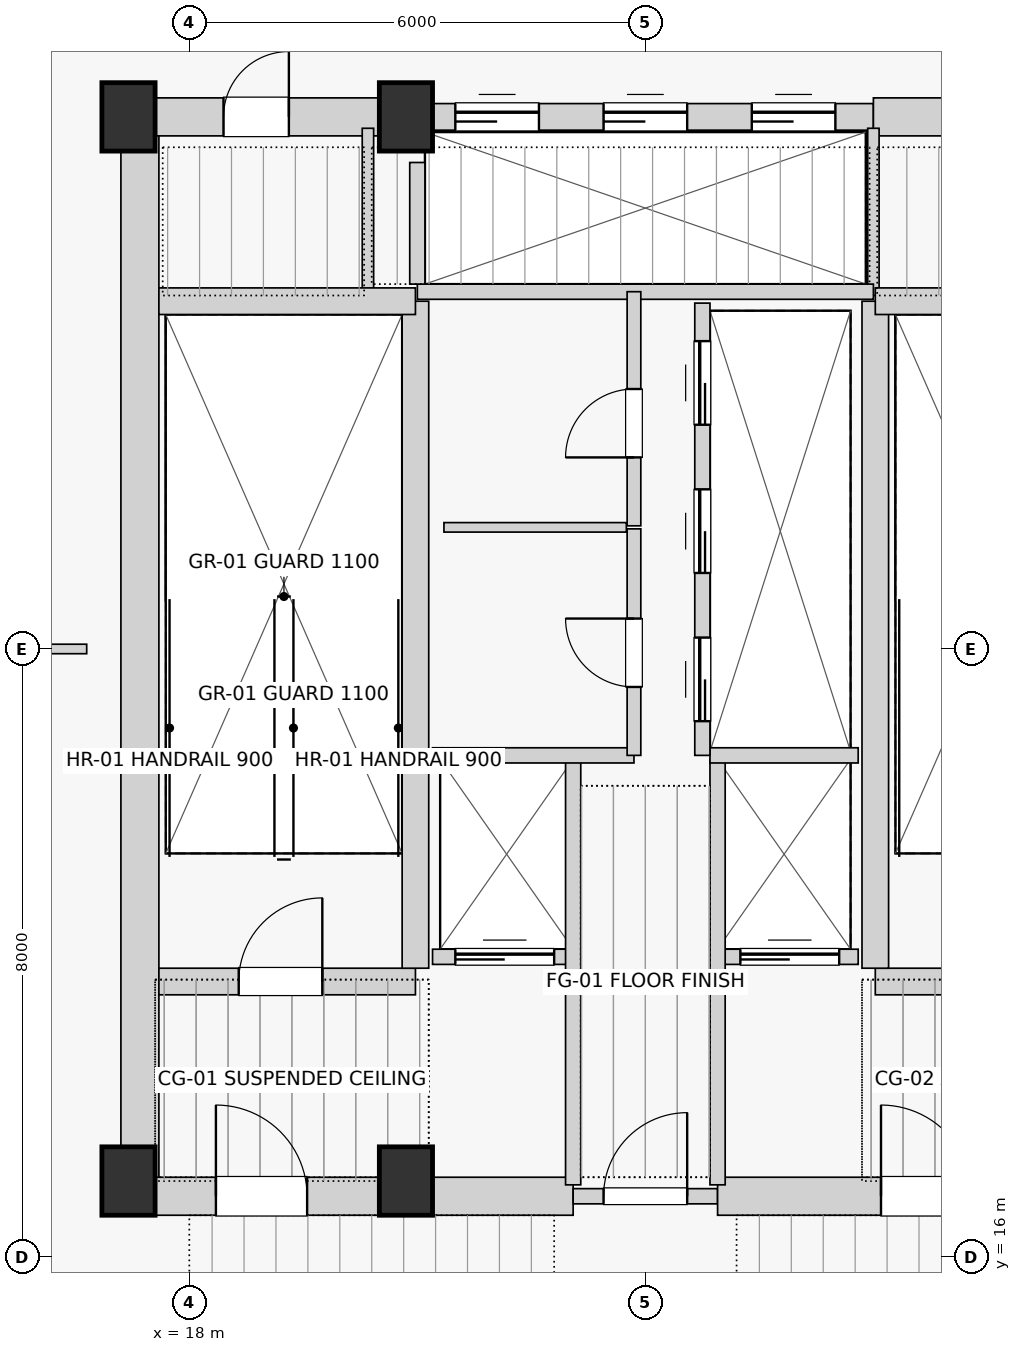
"""IFC4 building model, lengths in metres.
Left out: names, types, materials, properties, quantities, classifications, styles, units other than length and angle.
Written with IfcOpenShell. Run it as: python <this file> out.ifc"""

import sys

from ifc_helpers import new_model, si_unit, direction, frame, frame_2d, origin, origin_2d, place, context, subcontext, project, spatial, rectangle, extrude, source, transform, mapped, element, fill, save


model = new_model("IFC4")
c1 = context("Model", 3, precision=1e-05, world=origin(), true_north=direction((0.0, 1.0)))
c2 = subcontext(c1, "Body", "Model", "MODEL_VIEW")
j1 = project(units=[si_unit("LENGTHUNIT", "METRE"), si_unit("PLANEANGLEUNIT", "RADIAN")], contexts=[c1])
p1 = place(None, origin())
s1 = spatial("IfcSite", under=j1, at=p1, CompositionType="ELEMENT")
p2 = place(p1, origin())
s2 = spatial("IfcBuilding", under=s1, at=p2, CompositionType="ELEMENT")
p3 = place(p2, frame((0.0, 0.0, 174.35)))
s3 = spatial("IfcBuildingStorey", under=s2, at=p3, CompositionType="ELEMENT", Elevation=174.35)
for number, where, z_axis, x_axis in (
    (1, (17.2, 17.0, 0.0), (0.0, 0.0, 1.0), (1.0, 0.0, 0.0)),
    (2, (20.85, 17.0, 0.0), (0.0, 0.0, 1.0), (1.0, 0.0, 0.0)),
    (3, (17.2, 31.0, 0.0), (0.0, 0.0, 1.0), (1.0, 0.0, 0.0)),
    (4, (20.85, 31.0, 0.0), (0.0, 0.0, 1.0), (1.0, 0.0, 0.0)),
):
    element("IfcColumn", number, at=place(p3, frame(where, z_axis=z_axis, x_axis=x_axis)), inside=s3, PredefinedType="PILASTER", context=c2, shape_type="SweptSolid", body=[
        extrude(rectangle(XDim=0.7, YDim=0.9, at=origin_2d()), origin(), (0.0, 0.0, 1.0), 4.5),
    ])
p4 = place(p3, frame((17.35, 16.8, 0.0), z_axis=(0.0, 0.0, 1.0), x_axis=(0.0, 1.0, 0.0)))
e5 = element("IfcWall", 5, at=p4, inside=s3, PredefinedType="SHEAR", context=c2, shape_type="SweptSolid", body=[
    extrude(rectangle(XDim=14.2, YDim=0.5, at=frame_2d((7.1, 0.0))), origin(), (0.0, 0.0, 1.0), 4.265),
])
p5 = place(p3, frame((17.2, 16.8, 0.0), z_axis=(0.0, 0.0, 1.0), x_axis=(1.0, 0.0, 0.0)))
e6 = element("IfcWall", 6, at=p5, inside=s3, PredefinedType="SHEAR", context=c2, shape_type="SweptSolid", body=[
    extrude(rectangle(XDim=5.85, YDim=0.5, at=frame_2d((2.925, 0.0))), origin(), (0.0, 0.0, 1.0), 4.265),
])
p6 = place(p5, frame((1.15, 0.0, 0.0)))
e7 = element("IfcOpeningElement", 7, at=p6, cuts=e6, PredefinedType="OPENING", context=c2, shape_type="SweptSolid", body=[
    extrude(rectangle(XDim=1.2, YDim=2.03, at=frame_2d((0.6, 1.015))), frame((0.0, 0.26, 0.0), z_axis=(0.0, -1.0, 0.0), x_axis=(1.0, 0.0, 0.0)), (0.0, 0.0, 1.0), 0.52),
])
p7 = place(p3, frame((23.05, 16.8, 0.0), z_axis=(0.0, 0.0, 1.0), x_axis=(1.0, 0.0, 0.0)))
e8 = element("IfcWall", 8, at=p7, inside=s3, PredefinedType="SOLIDWALL", context=c2, shape_type="SweptSolid", body=[
    extrude(rectangle(XDim=1.9, YDim=0.2, at=frame_2d((0.95, 0.0))), origin(), (0.0, 0.0, 1.0), 3.415),
])
p8 = place(p7, frame((0.4, 0.0, 0.0)))
e9 = element("IfcOpeningElement", 9, at=p8, cuts=e8, PredefinedType="OPENING", context=c2, shape_type="SweptSolid", body=[
    extrude(rectangle(XDim=1.1, YDim=2.03, at=frame_2d((0.55, 1.015))), frame((0.0, 0.11, 0.0), z_axis=(0.0, -1.0, 0.0), x_axis=(1.0, 0.0, 0.0)), (0.0, 0.0, 1.0), 0.22),
])
p9 = place(p3, frame((24.95, 16.8, 0.0), z_axis=(0.0, 0.0, 1.0), x_axis=(1.0, 0.0, 0.0)))
e10 = element("IfcWall", 10, at=p9, inside=s3, PredefinedType="SHEAR", context=c2, shape_type="SweptSolid", body=[
    extrude(rectangle(XDim=5.85, YDim=0.5, at=frame_2d((2.925, 0.0))), origin(), (0.0, 0.0, 1.0), 4.265),
])
p10 = place(p9, frame((2.15, 0.0, 0.0)))
e11 = element("IfcOpeningElement", 11, at=p10, cuts=e10, PredefinedType="OPENING", context=c2, shape_type="SweptSolid", body=[
    extrude(rectangle(XDim=1.2, YDim=2.03, at=frame_2d((0.6, 1.015))), frame((0.0, 0.26, 0.0), z_axis=(0.0, -1.0, 0.0), x_axis=(1.0, 0.0, 0.0)), (0.0, 0.0, 1.0), 0.52),
])
p11 = place(p3, frame((17.2, 31.0, 0.0), z_axis=(0.0, 0.0, 1.0), x_axis=(1.0, 0.0, 0.0)))
e12 = element("IfcWall", 12, at=p11, inside=s3, PredefinedType="SHEAR", context=c2, shape_type="SweptSolid", body=[
    extrude(rectangle(XDim=3.8, YDim=0.5, at=frame_2d((1.9, 0.0))), origin(), (0.0, 0.0, 1.0), 4.265),
])
p12 = place(p11, frame((1.25, 0.0, 0.0)))
e13 = element("IfcOpeningElement", 13, at=p12, cuts=e12, PredefinedType="OPENING", context=c2, shape_type="SweptSolid", body=[
    extrude(rectangle(XDim=0.86, YDim=2.01, at=frame_2d((0.43, 1.005))), frame((0.0, 0.26, 0.0), z_axis=(0.0, -1.0, 0.0), x_axis=(1.0, 0.0, 0.0)), (0.0, 0.0, 1.0), 0.52),
])
p13 = place(p3, frame((21.0, 31.0, 0.0), z_axis=(0.0, 0.0, 1.0), x_axis=(1.0, 0.0, 0.0)))
e14 = element("IfcWall", 14, at=p13, inside=s3, PredefinedType="SHEAR", context=c2, shape_type="SweptSolid", body=[
    extrude(rectangle(XDim=6.0, YDim=0.35, at=frame_2d((3.0, 0.0))), origin(), (0.0, 0.0, 1.0), 4.265),
])
p14 = place(p13, frame((0.5, 0.0, 0.0)))
e15 = element("IfcOpeningElement", 15, at=p14, cuts=e14, PredefinedType="OPENING", context=c2, shape_type="SweptSolid", body=[
    extrude(rectangle(XDim=1.1, YDim=2.08, at=frame_2d((0.55, 1.04))), frame((0.0, 0.185, 0.0), z_axis=(0.0, -1.0, 0.0), x_axis=(1.0, 0.0, 0.0)), (0.0, 0.0, 1.0), 0.37),
])
p15 = place(p13, frame((2.45, 0.0, 0.0)))
e16 = element("IfcOpeningElement", 16, at=p15, cuts=e14, PredefinedType="OPENING", context=c2, shape_type="SweptSolid", body=[
    extrude(rectangle(XDim=1.1, YDim=2.08, at=frame_2d((0.55, 1.04))), frame((0.0, 0.185, 0.0), z_axis=(0.0, -1.0, 0.0), x_axis=(1.0, 0.0, 0.0)), (0.0, 0.0, 1.0), 0.37),
])
p16 = place(p13, frame((4.4, 0.0, 0.0)))
e17 = element("IfcOpeningElement", 17, at=p16, cuts=e14, PredefinedType="OPENING", context=c2, shape_type="SweptSolid", body=[
    extrude(rectangle(XDim=1.1, YDim=2.08, at=frame_2d((0.55, 1.04))), frame((0.0, 0.185, 0.0), z_axis=(0.0, -1.0, 0.0), x_axis=(1.0, 0.0, 0.0)), (0.0, 0.0, 1.0), 0.37),
])
p17 = place(p3, frame((27.0, 31.0, 0.0), z_axis=(0.0, 0.0, 1.0), x_axis=(1.0, 0.0, 0.0)))
e18 = element("IfcWall", 18, at=p17, inside=s3, PredefinedType="SHEAR", context=c2, shape_type="SweptSolid", body=[
    extrude(rectangle(XDim=3.8, YDim=0.5, at=frame_2d((1.9, 0.0))), origin(), (0.0, 0.0, 1.0), 4.265),
])
p18 = place(p17, frame((1.15, 0.0, 0.0)))
e19 = element("IfcOpeningElement", 19, at=p18, cuts=e18, PredefinedType="OPENING", context=c2, shape_type="SweptSolid", body=[
    extrude(rectangle(XDim=1.0, YDim=2.01, at=frame_2d((0.5, 1.005))), frame((0.0, 0.26, 0.0), z_axis=(0.0, -1.0, 0.0), x_axis=(1.0, 0.0, 0.0)), (0.0, 0.0, 1.0), 0.52),
])
for number, where, z_axis, x_axis in (
    (20, (20.35, 28.65, 0.0), (0.0, 0.0, 1.0), (0.0, 1.0, 0.0)),
    (21, (27.0, 28.65, 0.0), (0.0, 0.0, 1.0), (0.0, 1.0, 0.0)),
):
    element("IfcWall", number, at=place(p3, frame(where, z_axis=z_axis, x_axis=x_axis)), inside=s3, PredefinedType="PARTITIONING", context=c2, shape_type="SweptSolid", body=[
        extrude(rectangle(XDim=2.2, YDim=0.15, at=frame_2d((1.1, 0.0))), origin(), (0.0, 0.0, 1.0), 4.265),
    ])
p19 = place(p3, frame((17.6, 19.625, 0.0), z_axis=(0.0, 0.0, 1.0), x_axis=(1.0, 0.0, 0.0)))
e22 = element("IfcWall", 22, at=p19, inside=s3, PredefinedType="SHEAR", context=c2, shape_type="SweptSolid", body=[
    extrude(rectangle(XDim=3.375, YDim=0.35, at=frame_2d((1.688, 0.0))), origin(), (0.0, 0.0, 1.0), 4.265),
])
p20 = place(p19, frame((1.05, 0.0, 0.0)))
e23 = element("IfcOpeningElement", 23, at=p20, cuts=e22, PredefinedType="OPENING", context=c2, shape_type="SweptSolid", body=[
    extrude(rectangle(XDim=1.1, YDim=2.03, at=frame_2d((0.55, 1.015))), frame((0.0, 0.185, 0.0), z_axis=(0.0, -1.0, 0.0), x_axis=(1.0, 0.0, 0.0)), (0.0, 0.0, 1.0), 0.37),
])
p21 = place(p3, frame((21.2, 19.95, 0.0), z_axis=(0.0, 0.0, 1.0), x_axis=(1.0, 0.0, 0.0)))
e24 = element("IfcWall", 24, at=p21, inside=s3, PredefinedType="SOLIDWALL", context=c2, shape_type="SweptSolid", body=[
    extrude(rectangle(XDim=1.85, YDim=0.2, at=frame_2d((0.925, 0.0))), origin(), (0.0, 0.0, 1.0), 4.265),
])
p22 = place(p21, frame((0.3, 0.0, 0.0)))
e25 = element("IfcOpeningElement", 25, at=p22, cuts=e24, PredefinedType="OPENING", context=c2, shape_type="SweptSolid", body=[
    extrude(rectangle(XDim=1.3, YDim=2.25, at=frame_2d((0.65, 1.125))), frame((0.0, 0.11, 0.0), z_axis=(0.0, -1.0, 0.0), x_axis=(1.0, 0.0, 0.0)), (0.0, 0.0, 1.0), 0.22),
])
p23 = place(p3, frame((24.95, 19.95, 0.0), z_axis=(0.0, 0.0, 1.0), x_axis=(1.0, 0.0, 0.0)))
e26 = element("IfcWall", 26, at=p23, inside=s3, PredefinedType="SOLIDWALL", context=c2, shape_type="SweptSolid", body=[
    extrude(rectangle(XDim=1.85, YDim=0.2, at=frame_2d((0.925, 0.0))), origin(), (0.0, 0.0, 1.0), 4.265),
])
p24 = place(p23, frame((0.3, 0.0, 0.0)))
e27 = element("IfcOpeningElement", 27, at=p24, cuts=e26, PredefinedType="OPENING", context=c2, shape_type="SweptSolid", body=[
    extrude(rectangle(XDim=1.3, YDim=2.25, at=frame_2d((0.65, 1.125))), frame((0.0, 0.11, 0.0), z_axis=(0.0, -1.0, 0.0), x_axis=(1.0, 0.0, 0.0)), (0.0, 0.0, 1.0), 0.22),
])
p25 = place(p3, frame((27.025, 19.625, 0.0), z_axis=(0.0, 0.0, 1.0), x_axis=(1.0, 0.0, 0.0)))
e28 = element("IfcWall", 28, at=p25, inside=s3, PredefinedType="SHEAR", context=c2, shape_type="SweptSolid", body=[
    extrude(rectangle(XDim=3.375, YDim=0.35, at=frame_2d((1.688, 0.0))), origin(), (0.0, 0.0, 1.0), 4.265),
])
p26 = place(p25, frame((1.05, 0.0, 0.0)))
e29 = element("IfcOpeningElement", 29, at=p26, cuts=e28, PredefinedType="OPENING", context=c2, shape_type="SweptSolid", body=[
    extrude(rectangle(XDim=1.1, YDim=2.03, at=frame_2d((0.55, 1.015))), frame((0.0, 0.185, 0.0), z_axis=(0.0, -1.0, 0.0), x_axis=(1.0, 0.0, 0.0)), (0.0, 0.0, 1.0), 0.37),
])
for number, where, z_axis, x_axis in (
    (30, (20.975, 19.8, 0.0), (0.0, 0.0, 1.0), (0.0, 1.0, 0.0)),
    (31, (27.025, 19.8, 0.0), (0.0, 0.0, 1.0), (0.0, 1.0, 0.0)),
):
    element("IfcWall", number, at=place(p3, frame(where, z_axis=z_axis, x_axis=x_axis)), inside=s3, PredefinedType="SHEAR", context=c2, shape_type="SweptSolid", body=[
        extrude(rectangle(XDim=8.775, YDim=0.35, at=frame_2d((4.387, 0.0))), origin(), (0.0, 0.0, 1.0), 4.265),
    ])
for number, where, z_axis, x_axis in (
    (32, (17.6, 28.575, 0.0), (0.0, 0.0, 1.0), (1.0, 0.0, 0.0)),
    (33, (27.025, 28.575, 0.0), (0.0, 0.0, 1.0), (1.0, 0.0, 0.0)),
):
    element("IfcWall", number, at=place(p3, frame(where, z_axis=z_axis, x_axis=x_axis)), inside=s3, PredefinedType="SHEAR", context=c2, shape_type="SweptSolid", body=[
        extrude(rectangle(XDim=3.375, YDim=0.35, at=frame_2d((1.688, 0.0))), origin(), (0.0, 0.0, 1.0), 4.265),
    ])
for number, where, z_axis, x_axis in (
    (34, (23.05, 16.95, 0.0), (0.0, 0.0, 1.0), (0.0, 1.0, 0.0)),
    (35, (24.95, 16.95, 0.0), (0.0, 0.0, 1.0), (0.0, 1.0, 0.0)),
):
    element("IfcWall", number, at=place(p3, frame(where, z_axis=z_axis, x_axis=x_axis)), inside=s3, PredefinedType="SOLIDWALL", context=c2, shape_type="SweptSolid", body=[
        extrude(rectangle(XDim=5.6, YDim=0.2, at=frame_2d((2.8, 0.0))), origin(), (0.0, 0.0, 1.0), 4.265),
    ])
p27 = place(p3, frame((21.2, 22.6, 0.0), z_axis=(0.0, 0.0, 1.0), x_axis=(1.0, 0.0, 0.0)))
e36 = element("IfcWall", 36, at=p27, inside=s3, PredefinedType="SOLIDWALL", context=c2, shape_type="SweptSolid", body=[
    extrude(rectangle(XDim=2.65, YDim=0.2, at=frame_2d((1.325, 0.0))), origin(), (0.0, 0.0, 1.0), 4.265),
])
p28 = place(p3, frame((24.85, 22.6, 0.0), z_axis=(0.0, 0.0, 1.0), x_axis=(1.0, 0.0, 0.0)))
e37 = element("IfcWall", 37, at=p28, inside=s3, PredefinedType="SOLIDWALL", context=c2, shape_type="SweptSolid", body=[
    extrude(rectangle(XDim=1.95, YDim=0.2, at=frame_2d((0.975, 0.0))), origin(), (0.0, 0.0, 1.0), 4.265),
])
p29 = place(p3, frame((21.0, 28.7, 0.0), z_axis=(0.0, 0.0, 1.0), x_axis=(1.0, 0.0, 0.0)))
e38 = element("IfcWall", 38, at=p29, inside=s3, PredefinedType="SOLIDWALL", context=c2, shape_type="SweptSolid", body=[
    extrude(rectangle(XDim=6.0, YDim=0.2, at=frame_2d((3.0, 0.0))), origin(), (0.0, 0.0, 1.0), 4.265),
])
p30 = place(p3, frame((21.0, 28.8, 0.0), z_axis=(0.0, 0.0, 1.0), x_axis=(0.0, 1.0, 0.0)))
e39 = element("IfcWall", 39, at=p30, inside=s3, PredefinedType="SOLIDWALL", context=c2, shape_type="SweptSolid", body=[
    extrude(rectangle(XDim=1.6, YDim=0.2, at=frame_2d((0.8, 0.0))), origin(), (0.0, 0.0, 1.0), 4.265),
])
p31 = place(p3, frame((23.85, 22.6, 0.0), z_axis=(0.0, 0.0, 1.0), x_axis=(0.0, 1.0, 0.0)))
e40 = element("IfcWall", 40, at=p31, inside=s3, PredefinedType="PARTITIONING", context=c2, shape_type="SweptSolid", body=[
    extrude(rectangle(XDim=2.98, YDim=0.18, at=frame_2d((1.49, 0.0))), origin(), (0.0, 0.0, 1.0), 4.265),
])
p32 = place(p31, frame((0.9, 0.0, 0.0)))
e41 = element("IfcOpeningElement", 41, at=p32, cuts=e40, PredefinedType="OPENING", context=c2, shape_type="SweptSolid", body=[
    extrude(rectangle(XDim=0.9, YDim=2.01, at=frame_2d((0.45, 1.005))), frame((0.0, 0.1, 0.0), z_axis=(0.0, -1.0, 0.0), x_axis=(1.0, 0.0, 0.0)), (0.0, 0.0, 1.0), 0.2),
])
p33 = place(p3, frame((23.85, 25.62, 0.0), z_axis=(0.0, 0.0, 1.0), x_axis=(0.0, 1.0, 0.0)))
e42 = element("IfcWall", 42, at=p33, inside=s3, PredefinedType="PARTITIONING", context=c2, shape_type="SweptSolid", body=[
    extrude(rectangle(XDim=3.08, YDim=0.18, at=frame_2d((1.54, 0.0))), origin(), (0.0, 0.0, 1.0), 4.265),
])
p34 = place(p33, frame((0.9, 0.0, 0.0)))
e43 = element("IfcOpeningElement", 43, at=p34, cuts=e42, PredefinedType="OPENING", context=c2, shape_type="SweptSolid", body=[
    extrude(rectangle(XDim=0.9, YDim=2.01, at=frame_2d((0.45, 1.005))), frame((0.0, 0.1, 0.0), z_axis=(0.0, -1.0, 0.0), x_axis=(1.0, 0.0, 0.0)), (0.0, 0.0, 1.0), 0.2),
])
p35 = place(p3, frame((24.75, 22.6, 0.0), z_axis=(0.0, 0.0, 1.0), x_axis=(0.0, 1.0, 0.0)))
e44 = element("IfcWall", 44, at=p35, inside=s3, PredefinedType="SOLIDWALL", context=c2, shape_type="SweptSolid", body=[
    extrude(rectangle(XDim=5.95, YDim=0.2, at=frame_2d((2.975, 0.0))), origin(), (0.0, 0.0, 1.0), 4.265),
])
p36 = place(p35, frame((0.45, 0.0, 0.0)))
e45 = element("IfcOpeningElement", 45, at=p36, cuts=e44, PredefinedType="OPENING", context=c2, shape_type="SweptSolid", body=[
    extrude(rectangle(XDim=1.1, YDim=2.08, at=frame_2d((0.55, 1.04))), frame((0.0, 0.11, 0.0), z_axis=(0.0, -1.0, 0.0), x_axis=(1.0, 0.0, 0.0)), (0.0, 0.0, 1.0), 0.22),
])
p37 = place(p35, frame((2.4, 0.0, 0.0)))
e46 = element("IfcOpeningElement", 46, at=p37, cuts=e44, PredefinedType="OPENING", context=c2, shape_type="SweptSolid", body=[
    extrude(rectangle(XDim=1.1, YDim=2.08, at=frame_2d((0.55, 1.04))), frame((0.0, 0.11, 0.0), z_axis=(0.0, -1.0, 0.0), x_axis=(1.0, 0.0, 0.0)), (0.0, 0.0, 1.0), 0.22),
])
p38 = place(p35, frame((4.35, 0.0, 0.0)))
e47 = element("IfcOpeningElement", 47, at=p38, cuts=e44, PredefinedType="OPENING", context=c2, shape_type="SweptSolid", body=[
    extrude(rectangle(XDim=1.1, YDim=2.08, at=frame_2d((0.55, 1.04))), frame((0.0, 0.11, 0.0), z_axis=(0.0, -1.0, 0.0), x_axis=(1.0, 0.0, 0.0)), (0.0, 0.0, 1.0), 0.22),
])
p39 = place(p3, frame((21.35, 25.6, 0.0), z_axis=(0.0, 0.0, 1.0), x_axis=(1.0, 0.0, 0.0)))
e48 = element("IfcWall", 48, at=p39, inside=s3, PredefinedType="PARTITIONING", context=c2, shape_type="SweptSolid", body=[
    extrude(rectangle(XDim=2.4, YDim=0.125, at=frame_2d((1.2, 0.0))), origin(), (0.0, 0.0, 1.0), 4.265),
])
p40 = place(p3, frame((14.55, 24.0, 0.0), z_axis=(0.0, 0.0, 1.0), x_axis=(1.0, 0.0, 0.0)))
e49 = element("IfcWall", 49, at=p40, inside=s3, PredefinedType="PARTITIONING", context=c2, shape_type="SweptSolid", body=[
    extrude(rectangle(XDim=2.1, YDim=0.125, at=frame_2d((1.05, 0.0))), origin(), (0.0, 0.0, 1.0), 4.265),
])
m1 = source(origin(), c2, "Body", "SweptSolid", [
    extrude(rectangle(XDim=1.2, YDim=2.03, at=frame_2d((0.6, 1.015))), frame((0.0, 0.025, 0.0), z_axis=(0.0, -1.0, 0.0), x_axis=(1.0, 0.0, 0.0)), (0.0, 0.0, 1.0), 0.05),
])
p41 = place(p6, origin())
e50 = element("IfcDoor", 50, at=p41, inside=s3, OperationType="SINGLE_SWING_LEFT", PredefinedType="DOOR", context=c2, shape_type="MappedRepresentation", body=[
    mapped(m1, transform((0.0, 0.0, 0.0), scale=1.0)),
])
fill(e7, e50)
m2 = source(origin(), c2, "Body", "SweptSolid", [
    extrude(rectangle(XDim=1.1, YDim=2.03, at=frame_2d((0.55, 1.015))), frame((0.0, 0.025, 0.0), z_axis=(0.0, -1.0, 0.0), x_axis=(1.0, 0.0, 0.0)), (0.0, 0.0, 1.0), 0.05),
])
p42 = place(p8, origin())
e51 = element("IfcDoor", 51, at=p42, inside=s3, OperationType="SINGLE_SWING_RIGHT", PredefinedType="DOOR", context=c2, shape_type="MappedRepresentation", body=[
    mapped(m2, transform((0.0, 0.0, 0.0), scale=1.0)),
])
fill(e9, e51)
p43 = place(p10, origin())
e52 = element("IfcDoor", 52, at=p43, inside=s3, OperationType="SINGLE_SWING_LEFT", PredefinedType="DOOR", context=c2, shape_type="MappedRepresentation", body=[
    mapped(m1, transform((0.0, 0.0, 0.0), scale=1.0)),
])
fill(e11, e52)
m3 = source(origin(), c2, "Body", "SweptSolid", [
    extrude(rectangle(XDim=0.86, YDim=2.01, at=frame_2d((0.43, 1.005))), frame((0.0, 0.025, 0.0), z_axis=(0.0, -1.0, 0.0), x_axis=(1.0, 0.0, 0.0)), (0.0, 0.0, 1.0), 0.05),
])
p44 = place(p12, origin())
e53 = element("IfcDoor", 53, at=p44, inside=s3, OperationType="SINGLE_SWING_RIGHT", PredefinedType="DOOR", context=c2, shape_type="MappedRepresentation", body=[
    mapped(m3, transform((0.0, 0.0, 0.0), scale=1.0)),
])
fill(e13, e53)
m4 = source(origin(), c2, "Body", "SweptSolid", [
    extrude(rectangle(XDim=1.1, YDim=2.08, at=frame_2d((0.55, 1.04))), frame((0.0, 0.025, 0.0), z_axis=(0.0, -1.0, 0.0), x_axis=(1.0, 0.0, 0.0)), (0.0, 0.0, 1.0), 0.05),
])
p45 = place(p14, origin())
e54 = element("IfcDoor", 54, at=p45, inside=s3, OperationType="SLIDING_TO_LEFT", PredefinedType="DOOR", context=c2, shape_type="MappedRepresentation", body=[
    mapped(m4, transform((0.0, 0.0, 0.0), scale=1.0)),
])
fill(e15, e54)
p46 = place(p15, origin())
e55 = element("IfcDoor", 55, at=p46, inside=s3, OperationType="SLIDING_TO_LEFT", PredefinedType="DOOR", context=c2, shape_type="MappedRepresentation", body=[
    mapped(m4, transform((0.0, 0.0, 0.0), scale=1.0)),
])
fill(e16, e55)
p47 = place(p16, origin())
e56 = element("IfcDoor", 56, at=p47, inside=s3, OperationType="SLIDING_TO_LEFT", PredefinedType="DOOR", context=c2, shape_type="MappedRepresentation", body=[
    mapped(m4, transform((0.0, 0.0, 0.0), scale=1.0)),
])
fill(e17, e56)
p48 = place(p20, origin())
e57 = element("IfcDoor", 57, at=p48, inside=s3, OperationType="SINGLE_SWING_RIGHT", PredefinedType="DOOR", context=c2, shape_type="MappedRepresentation", body=[
    mapped(m2, transform((0.0, 0.0, 0.0), scale=1.0)),
])
fill(e23, e57)
m5 = source(origin(), c2, "Body", "SweptSolid", [
    extrude(rectangle(XDim=1.3, YDim=2.25, at=frame_2d((0.65, 1.125))), frame((0.0, 0.025, 0.0), z_axis=(0.0, -1.0, 0.0), x_axis=(1.0, 0.0, 0.0)), (0.0, 0.0, 1.0), 0.05),
])
p49 = place(p22, origin())
e58 = element("IfcDoor", 58, at=p49, inside=s3, OperationType="SLIDING_TO_LEFT", PredefinedType="DOOR", context=c2, shape_type="MappedRepresentation", body=[
    mapped(m5, transform((0.0, 0.0, 0.0), scale=1.0)),
])
fill(e25, e58)
p50 = place(p24, origin())
e59 = element("IfcDoor", 59, at=p50, inside=s3, OperationType="SLIDING_TO_LEFT", PredefinedType="DOOR", context=c2, shape_type="MappedRepresentation", body=[
    mapped(m5, transform((0.0, 0.0, 0.0), scale=1.0)),
])
fill(e27, e59)
m6 = source(origin(), c2, "Body", "SweptSolid", [
    extrude(rectangle(XDim=0.9, YDim=2.01, at=frame_2d((0.45, 1.005))), frame((0.0, 0.025, 0.0), z_axis=(0.0, -1.0, 0.0), x_axis=(1.0, 0.0, 0.0)), (0.0, 0.0, 1.0), 0.05),
])
p51 = place(p32, origin())
e60 = element("IfcDoor", 60, at=p51, inside=s3, OperationType="SINGLE_SWING_RIGHT", PredefinedType="DOOR", context=c2, shape_type="MappedRepresentation", body=[
    mapped(m6, transform((0.0, 0.0, 0.0), scale=1.0)),
])
fill(e41, e60)
p52 = place(p34, origin())
e61 = element("IfcDoor", 61, at=p52, inside=s3, OperationType="SINGLE_SWING_LEFT", PredefinedType="DOOR", context=c2, shape_type="MappedRepresentation", body=[
    mapped(m6, transform((0.0, 0.0, 0.0), scale=1.0)),
])
fill(e43, e61)
p53 = place(p36, origin())
e62 = element("IfcDoor", 62, at=p53, inside=s3, OperationType="SLIDING_TO_LEFT", PredefinedType="DOOR", context=c2, shape_type="MappedRepresentation", body=[
    mapped(m4, transform((0.0, 0.0, 0.0), scale=1.0)),
])
fill(e45, e62)
p54 = place(p37, origin())
e63 = element("IfcDoor", 63, at=p54, inside=s3, OperationType="SLIDING_TO_LEFT", PredefinedType="DOOR", context=c2, shape_type="MappedRepresentation", body=[
    mapped(m4, transform((0.0, 0.0, 0.0), scale=1.0)),
])
fill(e46, e63)
p55 = place(p38, origin())
e64 = element("IfcDoor", 64, at=p55, inside=s3, OperationType="SLIDING_TO_LEFT", PredefinedType="DOOR", context=c2, shape_type="MappedRepresentation", body=[
    mapped(m4, transform((0.0, 0.0, 0.0), scale=1.0)),
])
fill(e47, e64)
save(model, sys.argv[1])
